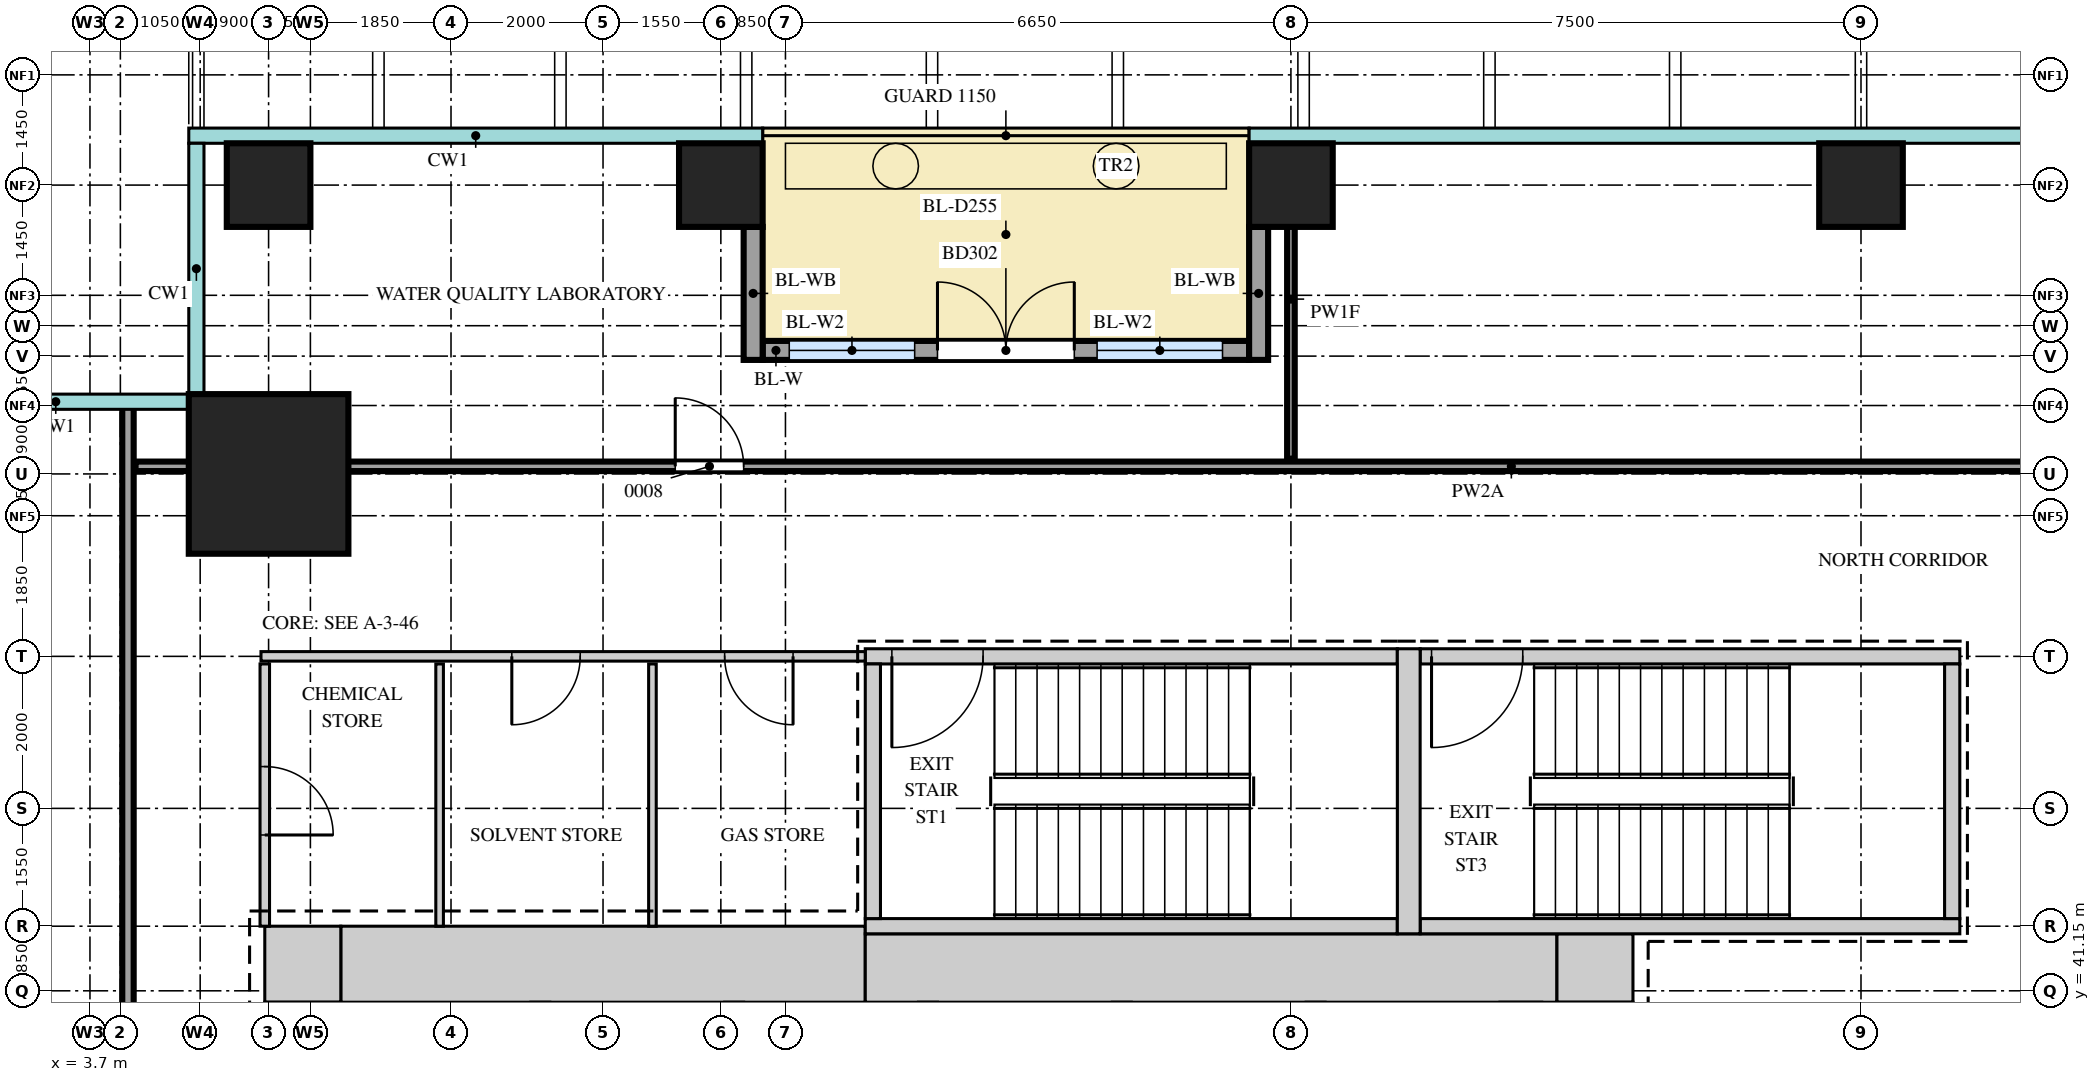
"""IFC4 building model, lengths in metres.
Left out: names, types, materials, properties, quantities, classifications, styles, units other than length and angle.
Written with IfcOpenShell. Run it as: python <this file> out.ifc"""

import sys

from ifc_helpers import new_model, si_unit, direction, frame, frame_2d, origin, origin_2d, place, context, subcontext, project, spatial, rectangle, extrude, source, transform, mapped, element, fill, save


model = new_model("IFC4")
c1 = context("Model", 3, precision=1e-05, world=origin(), true_north=direction((0.0, 1.0)))
c2 = subcontext(c1, "Body", "Model", "MODEL_VIEW")
j1 = project(units=[si_unit("LENGTHUNIT", "METRE"), si_unit("PLANEANGLEUNIT", "RADIAN")], contexts=[c1])
p1 = place(None, origin())
s1 = spatial("IfcSite", under=j1, at=p1, CompositionType="ELEMENT")
p2 = place(p1, origin())
s2 = spatial("IfcBuilding", under=s1, at=p2, CompositionType="ELEMENT")
p3 = place(p2, frame((0.0, 0.0, 141.1)))
s3 = spatial("IfcBuildingStorey", under=s2, at=p3, CompositionType="ELEMENT", Elevation=141.1)
m1 = source(origin(), c2, "Body", "SweptSolid", [
    extrude(rectangle(XDim=6.9, YDim=1.0, at=frame_2d((3.45, 0.0))), origin(), (0.0, 0.0, 1.0), 4.1),
])
p4 = place(p3, frame((7.0, 41.5, 0.0), z_axis=(0.0, 0.0, 1.0), x_axis=(1.0, 0.0, 0.0)))
e1 = element("IfcWall", 1, at=p4, inside=s3, PredefinedType="SHEAR", context=c2, shape_type="MappedRepresentation", body=[
    mapped(m1, transform((0.0, 0.0, 0.0))),
])
m2 = source(origin(), c2, "Body", "SweptSolid", [
    extrude(rectangle(XDim=9.1, YDim=0.9, at=frame_2d((4.55, 0.0))), origin(), (0.0, 0.0, 1.0), 4.1),
])
p5 = place(p3, frame((13.9, 41.45, 0.0), z_axis=(0.0, 0.0, 1.0), x_axis=(1.0, 0.0, 0.0)))
e2 = element("IfcWall", 2, at=p5, inside=s3, PredefinedType="SHEAR", context=c2, shape_type="MappedRepresentation", body=[
    mapped(m2, transform((0.0, 0.0, 0.0))),
])
m3 = source(origin(), c2, "Body", "SweptSolid", [
    extrude(rectangle(XDim=1.0, YDim=0.9, at=frame_2d((0.5, 0.0))), origin(), (0.0, 0.0, 1.0), 4.1),
])
p6 = place(p3, frame((23.0, 41.45, 0.0), z_axis=(0.0, 0.0, 1.0), x_axis=(1.0, 0.0, 0.0)))
e3 = element("IfcWall", 3, at=p6, inside=s3, PredefinedType="SHEAR", context=c2, shape_type="MappedRepresentation", body=[
    mapped(m3, transform((0.0, 0.0, 0.0))),
])
m4 = source(origin(), c2, "Body", "SweptSolid", [
    extrude(rectangle(XDim=1.0, YDim=1.0, at=frame_2d((0.5, 0.0))), origin(), (0.0, 0.0, 1.0), 4.1),
])
p7 = place(p3, frame((6.0, 41.5, 0.0), z_axis=(0.0, 0.0, 1.0), x_axis=(1.0, 0.0, 0.0)))
e4 = element("IfcWall", 4, at=p7, inside=s3, PredefinedType="SHEAR", context=c2, shape_type="MappedRepresentation", body=[
    mapped(m4, transform((0.0, 0.0, 0.0))),
])
m5 = source(origin(), c2, "Body", "SweptSolid", [
    extrude(rectangle(XDim=7.0, YDim=0.2, at=frame_2d((3.5, 0.0))), origin(), (0.0, 0.0, 1.0), 4.1),
])
p8 = place(p3, frame((13.9, 45.55, 0.0), z_axis=(0.0, 0.0, 1.0), x_axis=(1.0, 0.0, 0.0)))
e5 = element("IfcWall", 5, at=p8, inside=s3, PredefinedType="SHEAR", context=c2, shape_type="MappedRepresentation", body=[
    mapped(m5, transform((0.0, 0.0, 0.0))),
])
m6 = source(origin(), c2, "Body", "SweptSolid", [
    extrude(rectangle(XDim=1.2, YDim=2.1, at=frame_2d((0.6, 1.05))), frame((0.0, 0.11, 0.0), z_axis=(0.0, -1.0, 0.0), x_axis=(1.0, 0.0, 0.0)), (0.0, 0.0, 1.0), 0.22),
])
p9 = place(p8, frame((0.35, 0.0, 0.0)))
e6 = element("IfcOpeningElement", 6, at=p9, cuts=e5, PredefinedType="OPENING", context=c2, shape_type="MappedRepresentation", body=[
    mapped(m6, transform((0.0, 0.0, 0.0))),
])
p10 = place(p3, frame((13.9, 42.0, 0.0), z_axis=(0.0, 0.0, 1.0), x_axis=(1.0, 0.0, 0.0)))
e7 = element("IfcWall", 7, at=p10, inside=s3, PredefinedType="SHEAR", context=c2, shape_type="MappedRepresentation", body=[
    mapped(m5, transform((0.0, 0.0, 0.0))),
])
m7 = source(origin(), c2, "Body", "SweptSolid", [
    extrude(rectangle(XDim=7.1, YDim=0.2, at=frame_2d((3.55, 0.0))), origin(), (0.0, 0.0, 1.0), 4.1),
])
p11 = place(p3, frame((21.2, 45.55, 0.0), z_axis=(0.0, 0.0, 1.0), x_axis=(1.0, 0.0, 0.0)))
e8 = element("IfcWall", 8, at=p11, inside=s3, PredefinedType="SHEAR", context=c2, shape_type="MappedRepresentation", body=[
    mapped(m7, transform((0.0, 0.0, 0.0))),
])
p12 = place(p11, frame((0.15, 0.0, 0.0)))
e9 = element("IfcOpeningElement", 9, at=p12, cuts=e8, PredefinedType="OPENING", context=c2, shape_type="MappedRepresentation", body=[
    mapped(m6, transform((0.0, 0.0, 0.0))),
])
p13 = place(p3, frame((21.2, 42.0, 0.0), z_axis=(0.0, 0.0, 1.0), x_axis=(1.0, 0.0, 0.0)))
e10 = element("IfcWall", 10, at=p13, inside=s3, PredefinedType="SHEAR", context=c2, shape_type="MappedRepresentation", body=[
    mapped(m7, transform((0.0, 0.0, 0.0))),
])
m8 = source(origin(), c2, "Body", "SweptSolid", [
    extrude(rectangle(XDim=3.75, YDim=0.3, at=frame_2d((1.875, 0.0))), origin(), (0.0, 0.0, 1.0), 4.1),
])
p14 = place(p3, frame((21.05, 41.9, 0.0), z_axis=(0.0, 0.0, 1.0), x_axis=(0.0, 1.0, 0.0)))
e11 = element("IfcWall", 11, at=p14, inside=s3, PredefinedType="SHEAR", context=c2, shape_type="MappedRepresentation", body=[
    mapped(m8, transform((0.0, 0.0, 0.0))),
])
m9 = source(origin(), c2, "Body", "SweptSolid", [
    extrude(rectangle(XDim=3.35, YDim=0.2, at=frame_2d((1.675, 0.0))), origin(), (0.0, 0.0, 1.0), 4.1),
])
for number, where, z_axis, x_axis in (
    (12, (14.0, 42.1, 0.0), (0.0, 0.0, 1.0), (0.0, 1.0, 0.0)),
    (13, (28.2, 42.1, 0.0), (0.0, 0.0, 1.0), (0.0, 1.0, 0.0)),
):
    element("IfcWall", number, at=place(p3, frame(where, z_axis=z_axis, x_axis=x_axis)), inside=s3, PredefinedType="SHEAR", context=c2, shape_type="MappedRepresentation", body=[
        mapped(m9, transform((0.0, 0.0, 0.0))),
    ])
m10 = source(origin(), c2, "Body", "SweptSolid", [
    extrude(rectangle(XDim=2.1, YDim=2.1, at=origin_2d()), origin(), (0.0, 0.0, 1.0), 4.4),
])
p15 = place(p3, frame((6.05, 47.95, 0.0), z_axis=(0.0, 0.0, 1.0), x_axis=(1.0, 0.0, 0.0)))
e14 = element("IfcColumn", 14, at=p15, inside=s3, PredefinedType="COLUMN", context=c2, shape_type="MappedRepresentation", body=[
    mapped(m10, transform((0.0, 0.0, 0.0))),
])
m11 = source(origin(), c2, "Body", "SweptSolid", [
    extrude(rectangle(XDim=1.1, YDim=1.1, at=origin_2d()), origin(), (0.0, 0.0, 1.0), 4.1),
])
for number, where, z_axis, x_axis in (
    (15, (6.05, 51.75, 0.0), (0.0, 0.0, 1.0), (1.0, 0.0, 0.0)),
    (16, (12.0, 51.75, 0.0), (0.0, 0.0, 1.0), (1.0, 0.0, 0.0)),
    (17, (19.5, 51.75, 0.0), (0.0, 0.0, 1.0), (1.0, 0.0, 0.0)),
    (18, (27.0, 51.75, 0.0), (0.0, 0.0, 1.0), (1.0, 0.0, 0.0)),
):
    element("IfcColumn", number, at=place(p3, frame(where, z_axis=z_axis, x_axis=x_axis)), inside=s3, PredefinedType="COLUMN", context=c2, shape_type="MappedRepresentation", body=[
        mapped(m11, transform((0.0, 0.0, 0.0))),
    ])
m12 = source(origin(), c2, "Body", "SweptSolid", [
    extrude(rectangle(XDim=6.4, YDim=0.25, at=frame_2d((3.2, 0.0))), origin(), (0.0, 0.0, 1.0), 4.1),
])
p16 = place(p3, frame((12.55, 49.575, 0.0), z_axis=(0.0, 0.0, 1.0), x_axis=(1.0, 0.0, 0.0)))
e19 = element("IfcWall", 19, at=p16, inside=s3, PredefinedType="SOLIDWALL", context=c2, shape_type="MappedRepresentation", body=[
    mapped(m12, transform((0.0, 0.0, 0.0))),
])
m13 = source(origin(), c2, "Body", "SweptSolid", [
    extrude(rectangle(XDim=1.65, YDim=2.4, at=frame_2d((0.825, 1.2))), frame((0.0, 0.135, 0.0), z_axis=(0.0, -1.0, 0.0), x_axis=(1.0, 0.0, 0.0)), (0.0, 0.0, 1.0), 0.27),
])
p17 = place(p16, frame((0.35, 0.0, 0.0)))
e20 = element("IfcOpeningElement", 20, at=p17, cuts=e19, PredefinedType="OPENING", context=c2, shape_type="MappedRepresentation", body=[
    mapped(m13, transform((0.0, 0.0, 0.0))),
])
p18 = place(p16, frame((4.4, 0.0, 0.0)))
e21 = element("IfcOpeningElement", 21, at=p18, cuts=e19, PredefinedType="OPENING", context=c2, shape_type="MappedRepresentation", body=[
    mapped(m13, transform((0.0, 0.0, 0.0))),
])
m14 = source(origin(), c2, "Body", "SweptSolid", [
    extrude(rectangle(XDim=1.8, YDim=2.4, at=frame_2d((0.9, 1.2))), frame((0.0, 0.135, 0.0), z_axis=(0.0, -1.0, 0.0), x_axis=(1.0, 0.0, 0.0)), (0.0, 0.0, 1.0), 0.27),
])
p19 = place(p16, frame((2.3, 0.0, 0.0)))
e22 = element("IfcOpeningElement", 22, at=p19, cuts=e19, PredefinedType="OPENING", context=c2, shape_type="MappedRepresentation", body=[
    mapped(m14, transform((0.0, 0.0, 0.0))),
])
m15 = source(origin(), c2, "Body", "SweptSolid", [
    extrude(rectangle(XDim=1.75, YDim=0.25, at=frame_2d((0.875, 0.0))), origin(), (0.0, 0.0, 1.0), 3.8),
])
for number, where, z_axis, x_axis in (
    (23, (12.425, 51.2, 0.0), (0.0, 0.0, 1.0), (0.0, -1.0, 0.0)),
    (24, (19.075, 51.2, 0.0), (0.0, 0.0, 1.0), (0.0, -1.0, 0.0)),
):
    element("IfcWall", number, at=place(p3, frame(where, z_axis=z_axis, x_axis=x_axis)), inside=s3, PredefinedType="SOLIDWALL", context=c2, shape_type="MappedRepresentation", body=[
        mapped(m15, transform((0.0, 0.0, 0.0))),
    ])
m16 = source(origin(), c2, "Body", "SweptSolid", [
    extrude(rectangle(XDim=43.7, YDim=0.15, at=frame_2d((21.85, 0.0))), origin(), (0.0, 0.0, 1.0), 4.2),
])
p20 = place(p3, frame((4.2, 5.15, 0.0), z_axis=(0.0, 0.0, 1.0), x_axis=(0.0, 1.0, 0.0)))
e25 = element("IfcWall", 25, at=p20, inside=s3, PredefinedType="PARTITIONING", context=c2, shape_type="MappedRepresentation", body=[
    mapped(m16, transform((0.0, 0.0, 0.0))),
])
m17 = source(origin(), c2, "Body", "SweptSolid", [
    extrude(rectangle(XDim=0.9, YDim=2.1, at=frame_2d((0.45, 1.05))), frame((0.0, 0.085, 0.0), z_axis=(0.0, -1.0, 0.0), x_axis=(1.0, 0.0, 0.0)), (0.0, 0.0, 1.0), 0.17),
])
p21 = place(p20, frame((20.1, 0.0, 0.0)))
e26 = element("IfcOpeningElement", 26, at=p21, cuts=e25, PredefinedType="OPENING", context=c2, shape_type="MappedRepresentation", body=[
    mapped(m17, transform((0.0, 0.0, 0.0))),
])
m18 = source(origin(), c2, "Body", "SweptSolid", [
    extrude(rectangle(XDim=3.45, YDim=0.125, at=frame_2d((1.725, 0.0))), origin(), (0.0, 0.0, 1.0), 4.2),
])
p22 = place(p3, frame((6.0, 42.0, 0.0), z_axis=(0.0, 0.0, 1.0), x_axis=(0.0, 1.0, 0.0)))
e27 = element("IfcWall", 27, at=p22, inside=s3, PredefinedType="PARTITIONING", context=c2, shape_type="MappedRepresentation", body=[
    mapped(m18, transform((0.0, 0.0, 0.0))),
])
m19 = source(origin(), c2, "Body", "SweptSolid", [
    extrude(rectangle(XDim=0.9, YDim=2.1, at=frame_2d((0.45, 1.05))), frame((0.0, 0.073, 0.0), z_axis=(0.0, -1.0, 0.0), x_axis=(1.0, 0.0, 0.0)), (0.0, 0.0, 1.0), 0.145),
])
p23 = place(p22, frame((1.2, 0.0, 0.0)))
e28 = element("IfcOpeningElement", 28, at=p23, cuts=e27, PredefinedType="OPENING", context=c2, shape_type="MappedRepresentation", body=[
    mapped(m19, transform((0.0, 0.0, 0.0))),
])
m20 = source(origin(), c2, "Body", "SweptSolid", [
    extrude(rectangle(XDim=3.45, YDim=0.1, at=frame_2d((1.725, 0.0))), origin(), (0.0, 0.0, 1.0), 4.2),
])
for number, where, z_axis, x_axis in (
    (29, (8.3, 42.0, 0.0), (0.0, 0.0, 1.0), (0.0, 1.0, 0.0)),
    (30, (11.1, 42.0, 0.0), (0.0, 0.0, 1.0), (0.0, 1.0, 0.0)),
):
    element("IfcWall", number, at=place(p3, frame(where, z_axis=z_axis, x_axis=x_axis)), inside=s3, PredefinedType="PARTITIONING", context=c2, shape_type="MappedRepresentation", body=[
        mapped(m20, transform((0.0, 0.0, 0.0))),
    ])
m21 = source(origin(), c2, "Body", "SweptSolid", [
    extrude(rectangle(XDim=7.95, YDim=0.125, at=frame_2d((3.975, 0.0))), origin(), (0.0, 0.0, 1.0), 4.2),
])
p24 = place(p3, frame((5.95, 45.55, 0.0), z_axis=(0.0, 0.0, 1.0), x_axis=(1.0, 0.0, 0.0)))
e31 = element("IfcWall", 31, at=p24, inside=s3, PredefinedType="PARTITIONING", context=c2, shape_type="MappedRepresentation", body=[
    mapped(m21, transform((0.0, 0.0, 0.0))),
])
p25 = place(p24, frame((3.3, 0.0, 0.0)))
e32 = element("IfcOpeningElement", 32, at=p25, cuts=e31, PredefinedType="OPENING", context=c2, shape_type="MappedRepresentation", body=[
    mapped(m19, transform((0.0, 0.0, 0.0))),
])
p26 = place(p24, frame((6.1, 0.0, 0.0)))
e33 = element("IfcOpeningElement", 33, at=p26, cuts=e31, PredefinedType="OPENING", context=c2, shape_type="MappedRepresentation", body=[
    mapped(m19, transform((0.0, 0.0, 0.0))),
])
m22 = source(origin(), c2, "Body", "SweptSolid", [
    extrude(rectangle(XDim=42.05, YDim=0.125, at=frame_2d((21.025, 0.0))), origin(), (0.0, 0.0, 1.0), 3.55),
])
p27 = place(p3, frame((4.3, 48.05, 0.0), z_axis=(0.0, 0.0, 1.0), x_axis=(1.0, 0.0, 0.0)))
e34 = element("IfcWall", 34, at=p27, inside=s3, PredefinedType="PARTITIONING", context=c2, shape_type="MappedRepresentation", body=[
    mapped(m22, transform((0.0, 0.0, 0.0))),
])
p28 = place(p27, frame((7.1, 0.0, 0.0)))
e35 = element("IfcOpeningElement", 35, at=p28, cuts=e34, PredefinedType="OPENING", context=c2, shape_type="MappedRepresentation", body=[
    mapped(m19, transform((0.0, 0.0, 0.0))),
])
m23 = source(origin(), c2, "Body", "SweptSolid", [
    extrude(rectangle(XDim=1.2, YDim=2.1, at=frame_2d((0.6, 1.05))), frame((0.0, 0.073, 0.0), z_axis=(0.0, -1.0, 0.0), x_axis=(1.0, 0.0, 0.0)), (0.0, 0.0, 1.0), 0.145),
])
p29 = place(p27, frame((28.2, 0.0, 0.0)))
e36 = element("IfcOpeningElement", 36, at=p29, cuts=e34, PredefinedType="OPENING", context=c2, shape_type="MappedRepresentation", body=[
    mapped(m23, transform((0.0, 0.0, 0.0))),
])
m24 = source(origin(), c2, "Body", "SweptSolid", [
    extrude(rectangle(XDim=4.2, YDim=0.1, at=frame_2d((2.1, 0.0))), origin(), (0.0, 0.0, 1.0), 3.77),
])
p30 = place(p3, frame((19.5, 48.15, 0.0), z_axis=(0.0, 0.0, 1.0), x_axis=(0.0, 1.0, 0.0)))
e37 = element("IfcWall", 37, at=p30, inside=s3, PredefinedType="PARTITIONING", context=c2, shape_type="MappedRepresentation", body=[
    mapped(m24, transform((0.0, 0.0, 0.0))),
])
m25 = source(origin(), c2, "Body", "SweptSolid", [
    extrude(rectangle(XDim=1.65, YDim=2.4, at=frame_2d((0.825, 1.2))), frame((0.0, 0.03, 0.0), z_axis=(0.0, -1.0, 0.0), x_axis=(1.0, 0.0, 0.0)), (0.0, 0.0, 1.0), 0.06),
])
p31 = place(p17, origin())
e38 = element("IfcWindow", 38, at=p31, inside=s3, PartitioningType="SINGLE_PANEL", PredefinedType="WINDOW", context=c2, shape_type="MappedRepresentation", body=[
    mapped(m25, transform((0.0, 0.0, 0.0))),
])
fill(e20, e38)
p32 = place(p18, origin())
e39 = element("IfcWindow", 39, at=p32, inside=s3, PartitioningType="SINGLE_PANEL", PredefinedType="WINDOW", context=c2, shape_type="MappedRepresentation", body=[
    mapped(m25, transform((0.0, 0.0, 0.0))),
])
fill(e21, e39)
m26 = source(origin(), c2, "Body", "SweptSolid", [
    extrude(rectangle(XDim=1.8, YDim=2.4, at=frame_2d((0.9, 1.2))), frame((0.0, 0.025, 0.0), z_axis=(0.0, -1.0, 0.0), x_axis=(1.0, 0.0, 0.0)), (0.0, 0.0, 1.0), 0.05),
])
p33 = place(p19, origin())
e40 = element("IfcDoor", 40, at=p33, inside=s3, OperationType="DOUBLE_DOOR_DOUBLE_SWING", PredefinedType="DOOR", context=c2, shape_type="MappedRepresentation", body=[
    mapped(m26, transform((0.0, 0.0, 0.0))),
])
fill(e22, e40)
m27 = source(origin(), c2, "Body", "SweptSolid", [
    extrude(rectangle(XDim=0.9, YDim=2.1, at=frame_2d((0.45, 1.05))), frame((0.0, 0.025, 0.0), z_axis=(0.0, -1.0, 0.0), x_axis=(1.0, 0.0, 0.0)), (0.0, 0.0, 1.0), 0.05),
])
p34 = place(p28, origin())
e41 = element("IfcDoor", 41, at=p34, inside=s3, OperationType="SINGLE_SWING_RIGHT", PredefinedType="DOOR", context=c2, shape_type="MappedRepresentation", body=[
    mapped(m27, transform((0.0, 0.0, 0.0))),
])
fill(e35, e41)
p35 = place(p23, origin())
e42 = element("IfcDoor", 42, at=p35, inside=s3, OperationType="SINGLE_SWING_LEFT", PredefinedType="DOOR", context=c2, shape_type="MappedRepresentation", body=[
    mapped(m27, transform((0.0, 0.0, 0.0))),
])
fill(e28, e42)
p36 = place(p25, origin())
e43 = element("IfcDoor", 43, at=p36, inside=s3, OperationType="SINGLE_SWING_LEFT", PredefinedType="DOOR", context=c2, shape_type="MappedRepresentation", body=[
    mapped(m27, transform((0.0, 0.0, 0.0))),
])
fill(e32, e43)
p37 = place(p26, origin())
e44 = element("IfcDoor", 44, at=p37, inside=s3, OperationType="SINGLE_SWING_RIGHT", PredefinedType="DOOR", context=c2, shape_type="MappedRepresentation", body=[
    mapped(m27, transform((0.0, 0.0, 0.0))),
])
fill(e33, e44)
m28 = source(origin(), c2, "Body", "SweptSolid", [
    extrude(rectangle(XDim=1.2, YDim=2.1, at=frame_2d((0.6, 1.05))), frame((0.0, 0.025, 0.0), z_axis=(0.0, -1.0, 0.0), x_axis=(1.0, 0.0, 0.0)), (0.0, 0.0, 1.0), 0.05),
])
p38 = place(p9, origin())
e45 = element("IfcDoor", 45, at=p38, inside=s3, OperationType="SINGLE_SWING_LEFT", PredefinedType="DOOR", context=c2, shape_type="MappedRepresentation", body=[
    mapped(m28, transform((0.0, 0.0, 0.0))),
])
fill(e6, e45)
p39 = place(p12, origin())
e46 = element("IfcDoor", 46, at=p39, inside=s3, OperationType="SINGLE_SWING_LEFT", PredefinedType="DOOR", context=c2, shape_type="MappedRepresentation", body=[
    mapped(m28, transform((0.0, 0.0, 0.0))),
])
fill(e9, e46)
save(model, sys.argv[1])
